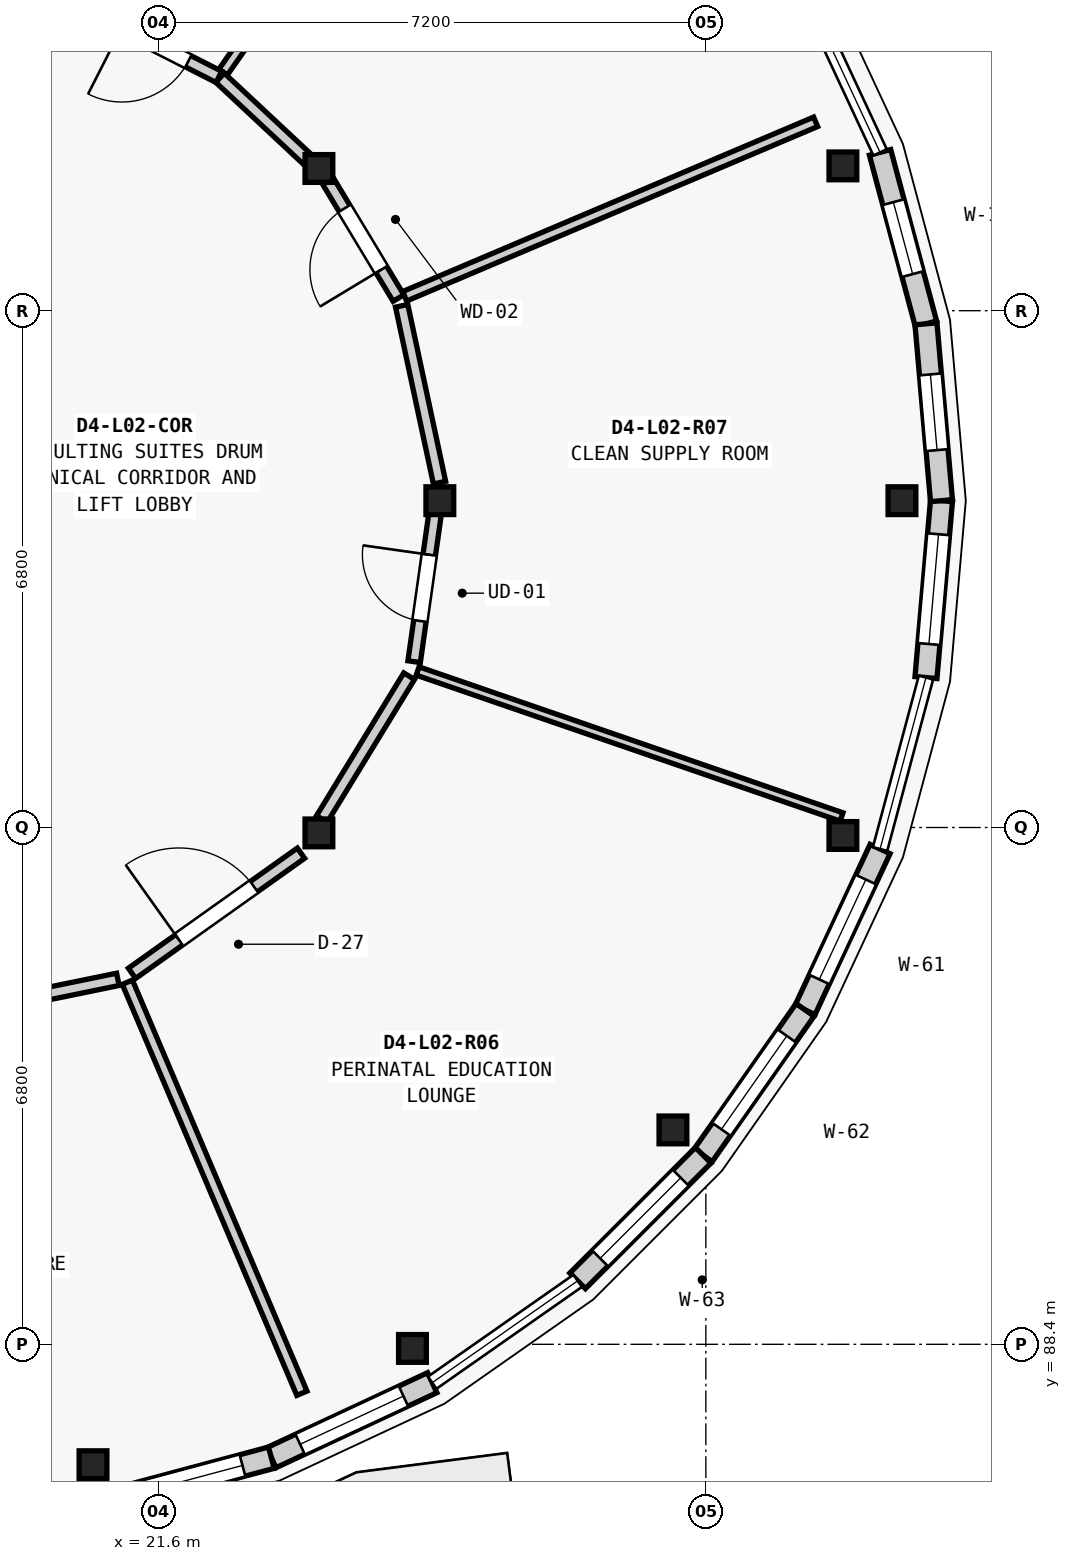
"""IFC4 building model, lengths in metres.
Left out: names, types, materials, properties, quantities, classifications, styles, units other than length and angle.
Written with IfcOpenShell. Run it as: python <this file> out.ifc"""

import sys

from ifc_helpers import new_model, si_unit, direction, frame, frame_2d, origin, origin_2d, place, context, subcontext, project, spatial, rectangle, extrude, element, fill, save


model = new_model("IFC4")
c1 = context("Model", 3, precision=1e-05, world=origin(), true_north=direction((0.0, 1.0)))
c2 = subcontext(c1, "Body", "Model", "MODEL_VIEW")
j1 = project(units=[si_unit("LENGTHUNIT", "METRE"), si_unit("PLANEANGLEUNIT", "RADIAN")], contexts=[c1])
p1 = place(None, origin())
s1 = spatial("IfcSite", under=j1, at=p1, CompositionType="ELEMENT")
p2 = place(p1, origin())
s2 = spatial("IfcBuilding", under=s1, at=p2, CompositionType="ELEMENT")
p3 = place(p2, frame((0.0, 0.0, 8.75)))
s3 = spatial("IfcBuildingStorey", under=s2, at=p3, CompositionType="ELEMENT", Elevation=8.75)
for number, where, z_axis, x_axis in (
    (1, (31.38, 99.5, 0.0), (0.0, 0.0, 1.0), (1.0, 0.0, 0.0)),
    (2, (30.603, 103.905, 0.0), (0.0, 0.0, 1.0), (1.0, 0.0, 0.0)),
    (3, (20.737, 86.816, 0.0), (0.0, 0.0, 1.0), (1.0, 0.0, 0.0)),
    (4, (24.94, 88.346, 0.0), (0.0, 0.0, 1.0), (1.0, 0.0, 0.0)),
    (5, (28.367, 91.221, 0.0), (0.0, 0.0, 1.0), (1.0, 0.0, 0.0)),
    (6, (30.603, 95.095, 0.0), (0.0, 0.0, 1.0), (1.0, 0.0, 0.0)),
    (7, (25.3, 99.5, 0.0), (0.0, 0.0, 1.0), (1.0, 0.0, 0.0)),
    (8, (23.709, 103.871, 0.0), (0.0, 0.0, 1.0), (1.0, 0.0, 0.0)),
    (9, (23.709, 95.129, 0.0), (0.0, 0.0, 1.0), (1.0, 0.0, 0.0)),
):
    element("IfcColumn", number, at=place(p3, frame(where, z_axis=z_axis, x_axis=x_axis)), inside=s3, PredefinedType="COLUMN", context=c2, shape_type="SweptSolid", body=[
        extrude(rectangle(XDim=0.365, YDim=0.365, at=origin_2d()), origin(), (0.0, 0.0, 1.0), 4.2),
    ])
p4 = place(p3, frame((31.9, 99.5, 0.0), z_axis=(0.0, 0.0, 1.0), x_axis=(-0.087274565792, -0.996184295282, 0.0)))
e10 = element("IfcWall", 10, at=p4, inside=s3, PredefinedType="ELEMENTEDWALL", context=c2, shape_type="SweptSolid", body=[
    extrude(rectangle(XDim=2.336, YDim=0.29, at=frame_2d((1.168, 0.0))), origin(), (0.0, 0.0, 1.0), 3.329),
])
p5 = place(p4, frame((0.443, 0.0, 0.85)))
e11 = element("IfcOpeningElement", 11, at=p5, cuts=e10, PredefinedType="OPENING", context=c2, shape_type="SweptSolid", body=[
    extrude(rectangle(XDim=1.45, YDim=1.75, at=frame_2d((0.725, 0.875))), frame((0.0, 0.155, 0.0), z_axis=(0.0, -1.0, 0.0), x_axis=(1.0, 0.0, 0.0)), (0.0, 0.0, 1.0), 0.31),
])
p6 = place(p3, frame((31.092, 94.917, 0.0), z_axis=(0.0, 0.0, 1.0), x_axis=(-0.422587894318, -0.906321946979, 0.0)))
e12 = element("IfcWall", 12, at=p6, inside=s3, PredefinedType="ELEMENTEDWALL", context=c2, shape_type="SweptSolid", body=[
    extrude(rectangle(XDim=2.336, YDim=0.29, at=frame_2d((1.168, 0.0))), origin(), (0.0, 0.0, 1.0), 3.329),
])
p7 = place(p6, frame((0.443, 0.0, 0.85)))
e13 = element("IfcOpeningElement", 13, at=p7, cuts=e12, PredefinedType="OPENING", context=c2, shape_type="SweptSolid", body=[
    extrude(rectangle(XDim=1.45, YDim=2.05, at=frame_2d((0.725, 1.025))), frame((0.0, 0.155, 0.0), z_axis=(0.0, -1.0, 0.0), x_axis=(1.0, 0.0, 0.0)), (0.0, 0.0, 1.0), 0.31),
])
p8 = place(p3, frame((30.105, 92.8, 0.0), z_axis=(0.0, 0.0, 1.0), x_axis=(-0.573728883722, -0.819045278347, 0.0)))
e14 = element("IfcWall", 14, at=p8, inside=s3, PredefinedType="ELEMENTEDWALL", context=c2, shape_type="SweptSolid", body=[
    extrude(rectangle(XDim=2.336, YDim=0.29, at=frame_2d((1.168, 0.0))), origin(), (0.0, 0.0, 1.0), 3.329),
])
p9 = place(p8, frame((0.418, 0.0, 0.85)))
e15 = element("IfcOpeningElement", 15, at=p9, cuts=e14, PredefinedType="OPENING", context=c2, shape_type="SweptSolid", body=[
    extrude(rectangle(XDim=1.5, YDim=1.3, at=frame_2d((0.75, 0.65))), frame((0.0, 0.155, 0.0), z_axis=(0.0, -1.0, 0.0), x_axis=(1.0, 0.0, 0.0)), (0.0, 0.0, 1.0), 0.31),
])
p10 = place(p3, frame((28.765, 90.887, 0.0), z_axis=(0.0, 0.0, 1.0), x_axis=(-0.707106781187, -0.707106781187, 0.0)))
e16 = element("IfcWall", 16, at=p10, inside=s3, PredefinedType="ELEMENTEDWALL", context=c2, shape_type="SweptSolid", body=[
    extrude(rectangle(XDim=2.336, YDim=0.29, at=frame_2d((1.168, 0.0))), origin(), (0.0, 0.0, 1.0), 3.329),
])
p11 = place(p10, frame((0.418, 0.0, 0.85)))
e17 = element("IfcOpeningElement", 17, at=p11, cuts=e16, PredefinedType="OPENING", context=c2, shape_type="SweptSolid", body=[
    extrude(rectangle(XDim=1.5, YDim=1.65, at=frame_2d((0.75, 0.825))), frame((0.0, 0.155, 0.0), z_axis=(0.0, -1.0, 0.0), x_axis=(1.0, 0.0, 0.0)), (0.0, 0.0, 1.0), 0.31),
])
p12 = place(p3, frame((25.2, 87.895, 0.0), z_axis=(0.0, 0.0, 1.0), x_axis=(-0.906321946979, -0.422587894318, 0.0)))
e18 = element("IfcWall", 18, at=p12, inside=s3, PredefinedType="ELEMENTEDWALL", context=c2, shape_type="SweptSolid", body=[
    extrude(rectangle(XDim=2.336, YDim=0.29, at=frame_2d((1.168, 0.0))), origin(), (0.0, 0.0, 1.0), 3.329),
])
p13 = place(p12, frame((0.418, 0.0, 0.85)))
e19 = element("IfcOpeningElement", 19, at=p13, cuts=e18, PredefinedType="OPENING", context=c2, shape_type="SweptSolid", body=[
    extrude(rectangle(XDim=1.5, YDim=1.95, at=frame_2d((0.75, 0.975))), frame((0.0, 0.155, 0.0), z_axis=(0.0, -1.0, 0.0), x_axis=(1.0, 0.0, 0.0)), (0.0, 0.0, 1.0), 0.31),
])
p14 = place(p3, frame((23.083, 86.908, 0.0), z_axis=(0.0, 0.0, 1.0), x_axis=(-0.965981166673, -0.258612423585, 0.0)))
e20 = element("IfcWall", 20, at=p14, inside=s3, PredefinedType="ELEMENTEDWALL", context=c2, shape_type="SweptSolid", body=[
    extrude(rectangle(XDim=2.335, YDim=0.29, at=frame_2d((1.168, 0.0))), origin(), (0.0, 0.0, 1.0), 3.329),
])
p15 = place(p14, frame((0.393, 0.0, 0.85)))
e21 = element("IfcOpeningElement", 21, at=p15, cuts=e20, PredefinedType="OPENING", context=c2, shape_type="SweptSolid", body=[
    extrude(rectangle(XDim=1.55, YDim=1.5, at=frame_2d((0.775, 0.75))), frame((0.0, 0.155, 0.0), z_axis=(0.0, -1.0, 0.0), x_axis=(1.0, 0.0, 0.0)), (0.0, 0.0, 1.0), 0.31),
])
p16 = place(p3, frame((31.092, 104.083, 0.0), z_axis=(0.0, 0.0, 1.0), x_axis=(0.258612423585, -0.965981166673, 0.0)))
e22 = element("IfcWall", 22, at=p16, inside=s3, PredefinedType="ELEMENTEDWALL", context=c2, shape_type="SweptSolid", body=[
    extrude(rectangle(XDim=2.335, YDim=0.29, at=frame_2d((1.168, 0.0))), origin(), (0.0, 0.0, 1.0), 3.329),
])
p17 = place(p16, frame((0.678, 0.0, 0.85)))
e23 = element("IfcOpeningElement", 23, at=p17, cuts=e22, PredefinedType="OPENING", context=c2, shape_type="SweptSolid", body=[
    extrude(rectangle(XDim=0.98, YDim=1.75, at=frame_2d((0.49, 0.875))), frame((0.0, 0.155, 0.0), z_axis=(0.0, -1.0, 0.0), x_axis=(1.0, 0.0, 0.0)), (0.0, 0.0, 1.0), 0.31),
])
p18 = place(p3, frame((31.696, 101.827, 0.0), z_axis=(0.0, 0.0, 1.0), x_axis=(0.087274565792, -0.996184295282, 0.0)))
e24 = element("IfcWall", 24, at=p18, inside=s3, PredefinedType="ELEMENTEDWALL", context=c2, shape_type="SweptSolid", body=[
    extrude(rectangle(XDim=2.336, YDim=0.29, at=frame_2d((1.168, 0.0))), origin(), (0.0, 0.0, 1.0), 3.329),
])
p19 = place(p18, frame((0.668, 0.0, 0.85)))
e25 = element("IfcOpeningElement", 25, at=p19, cuts=e24, PredefinedType="OPENING", context=c2, shape_type="SweptSolid", body=[
    extrude(rectangle(XDim=1.0, YDim=1.45, at=frame_2d((0.5, 0.725))), frame((0.0, 0.155, 0.0), z_axis=(0.0, -1.0, 0.0), x_axis=(1.0, 0.0, 0.0)), (0.0, 0.0, 1.0), 0.31),
])
p20 = place(p3, frame((21.189, 93.164, 0.0), z_axis=(0.0, 0.0, 1.0), x_axis=(0.390817685438, -0.920468107404, 0.0)))
e26 = element("IfcWall", 26, at=p20, inside=s3, PredefinedType="PARTITIONING", context=c2, shape_type="SweptSolid", body=[
    extrude(rectangle(XDim=5.875, YDim=0.145, at=frame_2d((2.938, 0.0))), origin(), (0.0, 0.0, 1.0), 3.304),
])
p21 = place(p3, frame((25.008, 97.259, 0.0), z_axis=(0.0, 0.0, 1.0), x_axis=(0.945537377012, -0.325513546068, 0.0)))
e27 = element("IfcWall", 27, at=p21, inside=s3, PredefinedType="PARTITIONING", context=c2, shape_type="SweptSolid", body=[
    extrude(rectangle(XDim=5.898, YDim=0.115, at=frame_2d((2.949, 0.0))), origin(), (0.0, 0.0, 1.0), 3.304),
])
p22 = place(p3, frame((24.836, 102.189, 0.0), z_axis=(0.0, 0.0, 1.0), x_axis=(0.920468107404, 0.390817685438, 0.0)))
e28 = element("IfcWall", 28, at=p22, inside=s3, PredefinedType="PLUMBINGWALL", context=c2, shape_type="SweptSolid", body=[
    extrude(rectangle(XDim=5.875, YDim=0.135, at=frame_2d((2.938, 0.0))), origin(), (0.0, 0.0, 1.0), 3.304),
])
p23 = place(p3, frame((22.448, 105.138, 0.0), z_axis=(0.0, 0.0, 1.0), x_axis=(0.573462344363, 0.819231920519, 0.0)))
e29 = element("IfcWall", 29, at=p23, inside=s3, PredefinedType="PLUMBINGWALL", context=c2, shape_type="SweptSolid", body=[
    extrude(rectangle(XDim=5.868, YDim=0.135, at=frame_2d((2.934, 0.0))), origin(), (0.0, 0.0, 1.0), 3.304),
])
p24 = place(p3, frame((19.804, 92.944, 0.0), z_axis=(0.0, 0.0, 1.0), x_axis=(0.97970222492, 0.200458351001, 0.0)))
e30 = element("IfcWall", 30, at=p24, inside=s3, PredefinedType="PARTITIONING", context=c2, shape_type="SweptSolid", body=[
    extrude(rectangle(XDim=1.286, YDim=0.165, at=frame_2d((0.643, 0.0))), origin(), (0.0, 0.0, 1.0), 3.304),
])
p25 = place(p3, frame((21.25, 93.281, 0.0), z_axis=(0.0, 0.0, 1.0), x_axis=(0.814898961152, 0.579603039255, 0.0)))
e31 = element("IfcWall", 31, at=p25, inside=s3, PredefinedType="PARTITIONING", context=c2, shape_type="SweptSolid", body=[
    extrude(rectangle(XDim=2.728, YDim=0.165, at=frame_2d((1.364, 0.0))), origin(), (0.0, 0.0, 1.0), 3.304),
])
p26 = place(p25, frame((0.759, 0.0, 0.0)))
e32 = element("IfcOpeningElement", 32, at=p26, cuts=e31, PredefinedType="OPENING", context=c2, shape_type="SweptSolid", body=[
    extrude(rectangle(XDim=1.21, YDim=2.16, at=frame_2d((0.605, 1.08))), frame((0.0, 0.093, 0.0), z_axis=(0.0, -1.0, 0.0), x_axis=(1.0, 0.0, 0.0)), (0.0, 0.0, 1.0), 0.185),
])
p27 = place(p3, frame((23.748, 95.312, 0.0), z_axis=(0.0, 0.0, 1.0), x_axis=(0.521360305461, 0.853336646283, 0.0)))
e33 = element("IfcWall", 33, at=p27, inside=s3, PredefinedType="PARTITIONING", context=c2, shape_type="SweptSolid", body=[
    extrude(rectangle(XDim=2.202, YDim=0.165, at=frame_2d((1.101, 0.0))), origin(), (0.0, 0.0, 1.0), 3.304),
])
p28 = place(p3, frame((24.962, 97.382, 0.0), z_axis=(0.0, 0.0, 1.0), x_axis=(0.140288499372, 0.990110669039, 0.0)))
e34 = element("IfcWall", 34, at=p28, inside=s3, PredefinedType="PARTITIONING", context=c2, shape_type="SweptSolid", body=[
    extrude(rectangle(XDim=1.961, YDim=0.165, at=frame_2d((0.98, 0.0))), origin(), (0.0, 0.0, 1.0), 3.304),
])
p29 = place(p28, frame((0.541, 0.0, 0.0)))
e35 = element("IfcOpeningElement", 35, at=p29, cuts=e34, PredefinedType="OPENING", context=c2, shape_type="SweptSolid", body=[
    extrude(rectangle(XDim=0.88, YDim=2.1, at=frame_2d((0.44, 1.05))), frame((0.0, 0.093, 0.0), z_axis=(0.0, -1.0, 0.0), x_axis=(1.0, 0.0, 0.0)), (0.0, 0.0, 1.0), 0.185),
])
p30 = place(p3, frame((25.296, 99.737, 0.0), z_axis=(0.0, 0.0, 1.0), x_axis=(-0.209199758456, 0.977872926848, 0.0)))
e36 = element("IfcWall", 36, at=p30, inside=s3, PredefinedType="PARTITIONING", context=c2, shape_type="SweptSolid", body=[
    extrude(rectangle(XDim=2.38, YDim=0.165, at=frame_2d((1.19, 0.0))), origin(), (0.0, 0.0, 1.0), 3.304),
])
p31 = place(p3, frame((24.756, 102.166, 0.0), z_axis=(0.0, 0.0, 1.0), x_axis=(-0.515979321691, 0.85660103875, 0.0)))
e37 = element("IfcWall", 37, at=p31, inside=s3, PredefinedType="PARTITIONING", context=c2, shape_type="SweptSolid", body=[
    extrude(rectangle(XDim=1.814, YDim=0.165, at=frame_2d((0.907, 0.0))), origin(), (0.0, 0.0, 1.0), 3.304),
])
p32 = place(p31, frame((0.437, 0.0, 0.0)))
e38 = element("IfcOpeningElement", 38, at=p32, cuts=e37, PredefinedType="OPENING", context=c2, shape_type="SweptSolid", body=[
    extrude(rectangle(XDim=0.94, YDim=2.1, at=frame_2d((0.47, 1.05))), frame((0.0, 0.093, 0.0), z_axis=(0.0, -1.0, 0.0), x_axis=(1.0, 0.0, 0.0)), (0.0, 0.0, 1.0), 0.185),
])
p33 = place(p3, frame((23.562, 103.987, 0.0), z_axis=(0.0, 0.0, 1.0), x_axis=(-0.730813584636, 0.682577105176, 0.0)))
e39 = element("IfcWall", 39, at=p33, inside=s3, PredefinedType="PARTITIONING", context=c2, shape_type="SweptSolid", body=[
    extrude(rectangle(XDim=1.579, YDim=0.165, at=frame_2d((0.79, 0.0))), origin(), (0.0, 0.0, 1.0), 3.304),
])
p34 = place(p3, frame((22.393, 105.076, 0.0), z_axis=(0.0, 0.0, 1.0), x_axis=(-0.891321219161, 0.453372346172, 0.0)))
e40 = element("IfcWall", 40, at=p34, inside=s3, PredefinedType="PARTITIONING", context=c2, shape_type="SweptSolid", body=[
    extrude(rectangle(XDim=1.884, YDim=0.165, at=frame_2d((0.942, 0.0))), origin(), (0.0, 0.0, 1.0), 3.304),
])
p35 = place(p34, frame((0.452, 0.0, 0.0)))
e41 = element("IfcOpeningElement", 41, at=p35, cuts=e40, PredefinedType="OPENING", context=c2, shape_type="SweptSolid", body=[
    extrude(rectangle(XDim=0.98, YDim=2.1, at=frame_2d((0.49, 1.05))), frame((0.0, 0.093, 0.0), z_axis=(0.0, -1.0, 0.0), x_axis=(1.0, 0.0, 0.0)), (0.0, 0.0, 1.0), 0.185),
])
p36 = place(p5, origin())
e42 = element("IfcWindow", 42, at=p36, inside=s3, PartitioningType="SINGLE_PANEL", PredefinedType="WINDOW", context=c2, shape_type="SweptSolid", body=[
    extrude(rectangle(XDim=1.45, YDim=1.75, at=frame_2d((0.725, 0.875))), frame((0.0, 0.03, 0.0), z_axis=(0.0, -1.0, 0.0), x_axis=(1.0, 0.0, 0.0)), (0.0, 0.0, 1.0), 0.06),
])
fill(e11, e42)
p37 = place(p7, origin())
e43 = element("IfcWindow", 43, at=p37, inside=s3, PartitioningType="SINGLE_PANEL", PredefinedType="WINDOW", context=c2, shape_type="SweptSolid", body=[
    extrude(rectangle(XDim=1.45, YDim=2.05, at=frame_2d((0.725, 1.025))), frame((0.0, 0.03, 0.0), z_axis=(0.0, -1.0, 0.0), x_axis=(1.0, 0.0, 0.0)), (0.0, 0.0, 1.0), 0.06),
])
fill(e13, e43)
p38 = place(p9, origin())
e44 = element("IfcWindow", 44, at=p38, inside=s3, PartitioningType="SINGLE_PANEL", PredefinedType="WINDOW", context=c2, shape_type="SweptSolid", body=[
    extrude(rectangle(XDim=1.5, YDim=1.3, at=frame_2d((0.75, 0.65))), frame((0.0, 0.03, 0.0), z_axis=(0.0, -1.0, 0.0), x_axis=(1.0, 0.0, 0.0)), (0.0, 0.0, 1.0), 0.06),
])
fill(e15, e44)
p39 = place(p11, origin())
e45 = element("IfcWindow", 45, at=p39, inside=s3, PartitioningType="SINGLE_PANEL", PredefinedType="WINDOW", context=c2, shape_type="SweptSolid", body=[
    extrude(rectangle(XDim=1.5, YDim=1.65, at=frame_2d((0.75, 0.825))), frame((0.0, 0.03, 0.0), z_axis=(0.0, -1.0, 0.0), x_axis=(1.0, 0.0, 0.0)), (0.0, 0.0, 1.0), 0.06),
])
fill(e17, e45)
p40 = place(p13, origin())
e46 = element("IfcWindow", 46, at=p40, inside=s3, PartitioningType="SINGLE_PANEL", PredefinedType="WINDOW", context=c2, shape_type="SweptSolid", body=[
    extrude(rectangle(XDim=1.5, YDim=1.95, at=frame_2d((0.75, 0.975))), frame((0.0, 0.03, 0.0), z_axis=(0.0, -1.0, 0.0), x_axis=(1.0, 0.0, 0.0)), (0.0, 0.0, 1.0), 0.06),
])
fill(e19, e46)
p41 = place(p15, origin())
e47 = element("IfcWindow", 47, at=p41, inside=s3, PartitioningType="SINGLE_PANEL", PredefinedType="WINDOW", context=c2, shape_type="SweptSolid", body=[
    extrude(rectangle(XDim=1.55, YDim=1.5, at=frame_2d((0.775, 0.75))), frame((0.0, 0.03, 0.0), z_axis=(0.0, -1.0, 0.0), x_axis=(1.0, 0.0, 0.0)), (0.0, 0.0, 1.0), 0.06),
])
fill(e21, e47)
p42 = place(p17, origin())
e48 = element("IfcWindow", 48, at=p42, inside=s3, PartitioningType="SINGLE_PANEL", PredefinedType="WINDOW", context=c2, shape_type="SweptSolid", body=[
    extrude(rectangle(XDim=0.98, YDim=1.75, at=frame_2d((0.49, 0.875))), frame((0.0, 0.03, 0.0), z_axis=(0.0, -1.0, 0.0), x_axis=(1.0, 0.0, 0.0)), (0.0, 0.0, 1.0), 0.06),
])
fill(e23, e48)
p43 = place(p19, origin())
e49 = element("IfcWindow", 49, at=p43, inside=s3, PartitioningType="SINGLE_PANEL", PredefinedType="WINDOW", context=c2, shape_type="SweptSolid", body=[
    extrude(rectangle(XDim=1.0, YDim=1.45, at=frame_2d((0.5, 0.725))), frame((0.0, 0.03, 0.0), z_axis=(0.0, -1.0, 0.0), x_axis=(1.0, 0.0, 0.0)), (0.0, 0.0, 1.0), 0.06),
])
fill(e25, e49)
p44 = place(p26, origin())
e50 = element("IfcDoor", 50, at=p44, inside=s3, OperationType="SINGLE_SWING_LEFT", PredefinedType="DOOR", context=c2, shape_type="SweptSolid", body=[
    extrude(rectangle(XDim=1.21, YDim=2.16, at=frame_2d((0.605, 1.08))), frame((0.0, 0.025, 0.0), z_axis=(0.0, -1.0, 0.0), x_axis=(1.0, 0.0, 0.0)), (0.0, 0.0, 1.0), 0.05),
])
fill(e32, e50)
p45 = place(p29, origin())
e51 = element("IfcDoor", 51, at=p45, inside=s3, OperationType="SINGLE_SWING_RIGHT", PredefinedType="DOOR", context=c2, shape_type="SweptSolid", body=[
    extrude(rectangle(XDim=0.88, YDim=2.1, at=frame_2d((0.44, 1.05))), frame((0.0, 0.025, 0.0), z_axis=(0.0, -1.0, 0.0), x_axis=(1.0, 0.0, 0.0)), (0.0, 0.0, 1.0), 0.05),
])
fill(e35, e51)
p46 = place(p32, origin())
e52 = element("IfcDoor", 52, at=p46, inside=s3, OperationType="SINGLE_SWING_LEFT", PredefinedType="DOOR", context=c2, shape_type="SweptSolid", body=[
    extrude(rectangle(XDim=0.94, YDim=2.1, at=frame_2d((0.47, 1.05))), frame((0.0, 0.025, 0.0), z_axis=(0.0, -1.0, 0.0), x_axis=(1.0, 0.0, 0.0)), (0.0, 0.0, 1.0), 0.05),
])
fill(e38, e52)
p47 = place(p35, origin())
e53 = element("IfcDoor", 53, at=p47, inside=s3, OperationType="SINGLE_SWING_RIGHT", PredefinedType="DOOR", context=c2, shape_type="SweptSolid", body=[
    extrude(rectangle(XDim=0.98, YDim=2.1, at=frame_2d((0.49, 1.05))), frame((0.0, 0.025, 0.0), z_axis=(0.0, -1.0, 0.0), x_axis=(1.0, 0.0, 0.0)), (0.0, 0.0, 1.0), 0.05),
])
fill(e41, e53)
save(model, sys.argv[1])
